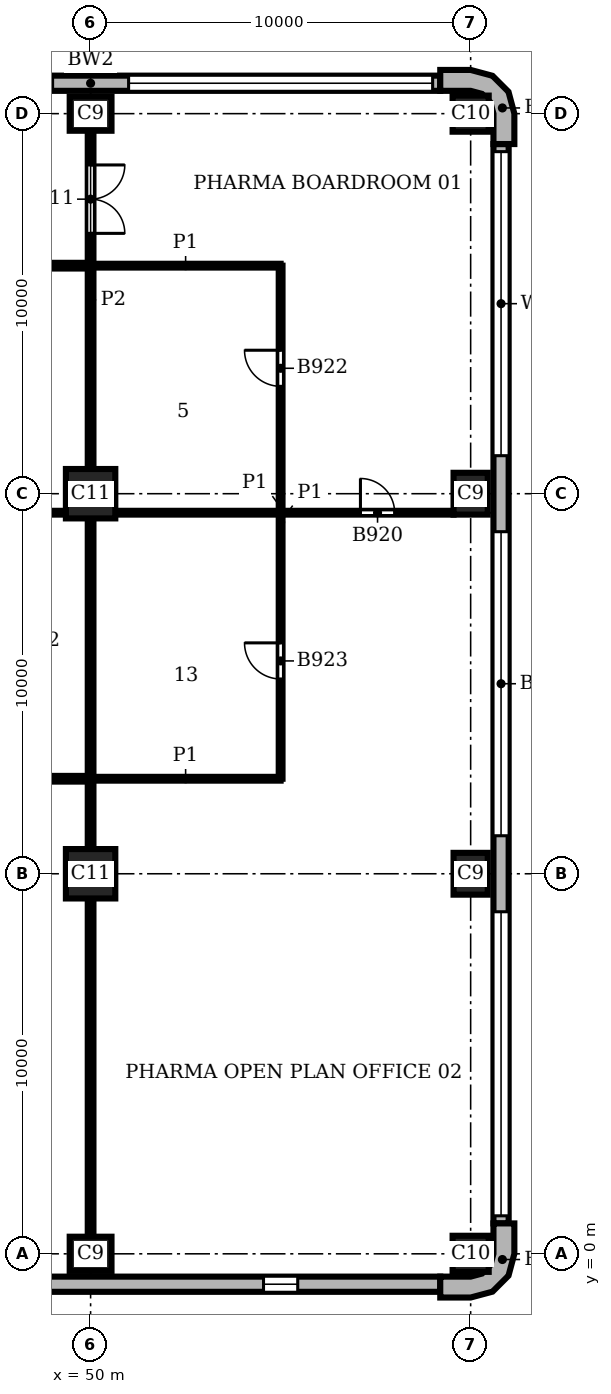
"""IFC4 building model, lengths in metres.
Left out: names, types, materials, properties, quantities, classifications, styles, units other than length and angle.
Written with IfcOpenShell. Run it as: python <this file> out.ifc"""

import sys

from ifc_helpers import new_model, si_unit, direction, frame, frame_2d, origin, origin_2d, place, context, subcontext, project, spatial, polyline, rectangle, outline, extrude, element, fill, save


model = new_model("IFC4")
c1 = context("Model", 3, precision=1e-05, world=origin(), true_north=direction((0.0, 1.0)))
c2 = subcontext(c1, "Body", "Model", "MODEL_VIEW")
j1 = project(units=[si_unit("LENGTHUNIT", "METRE"), si_unit("PLANEANGLEUNIT", "RADIAN")], contexts=[c1])
p1 = place(None, origin())
s1 = spatial("IfcSite", under=j1, at=p1, CompositionType="ELEMENT")
p2 = place(p1, origin())
s2 = spatial("IfcBuilding", under=s1, at=p2, CompositionType="ELEMENT")
p3 = place(p2, frame((0.0, 0.0, 233.1)))
s3 = spatial("IfcBuildingStorey", under=s2, at=p3, CompositionType="ELEMENT", Elevation=233.1)
p4 = place(p3, frame((50.0, 0.0, 0.0), z_axis=(0.0, 0.0, 1.0), x_axis=(1.0, 0.0, 0.0)))
e1 = element("IfcColumn", 1, at=p4, inside=s3, PredefinedType="COLUMN", context=c2, shape_type="SweptSolid", body=[
    extrude(rectangle(XDim=1.1, YDim=0.9, at=origin_2d()), origin(), (0.0, 0.0, 1.0), 3.9),
])
p5 = place(p3, frame((60.0, 0.0, 0.0), z_axis=(0.0, 0.0, 1.0), x_axis=(1.0, 0.0, 0.0)))
e2 = element("IfcColumn", 2, at=p5, inside=s3, PredefinedType="COLUMN", context=c2, shape_type="SweptSolid", body=[
    extrude(rectangle(XDim=0.95, YDim=0.95, at=origin_2d()), origin(), (0.0, 0.0, 1.0), 3.9),
])
for number, where, z_axis, x_axis in (
    (3, (60.0, 10.0, 0.0), (0.0, 0.0, 1.0), (0.0, 1.0, 0.0)),
    (4, (60.0, 20.0, 0.0), (0.0, 0.0, 1.0), (0.0, 1.0, 0.0)),
):
    element("IfcColumn", number, at=place(p3, frame(where, z_axis=z_axis, x_axis=x_axis)), inside=s3, PredefinedType="COLUMN", context=c2, shape_type="SweptSolid", body=[
        extrude(rectangle(XDim=1.1, YDim=0.9, at=origin_2d()), origin(), (0.0, 0.0, 1.0), 3.9),
    ])
p6 = place(p3, frame((60.0, 30.0, 0.0), z_axis=(0.0, 0.0, 1.0), x_axis=(1.0, 0.0, 0.0)))
e5 = element("IfcColumn", 5, at=p6, inside=s3, PredefinedType="COLUMN", context=c2, shape_type="SweptSolid", body=[
    extrude(rectangle(XDim=0.95, YDim=0.95, at=origin_2d()), origin(), (0.0, 0.0, 1.0), 3.9),
])
p7 = place(p3, frame((50.0, 30.0, 0.0), z_axis=(0.0, 0.0, 1.0), x_axis=(1.0, 0.0, 0.0)))
e6 = element("IfcColumn", 6, at=p7, inside=s3, PredefinedType="COLUMN", context=c2, shape_type="SweptSolid", body=[
    extrude(rectangle(XDim=1.1, YDim=0.9, at=origin_2d()), origin(), (0.0, 0.0, 1.0), 3.9),
])
for number, where, z_axis, x_axis in (
    (7, (50.0, 10.0, 0.0), (0.0, 0.0, 1.0), (1.0, 0.0, 0.0)),
    (8, (50.0, 20.0, 0.0), (0.0, 0.0, 1.0), (1.0, 0.0, 0.0)),
):
    element("IfcColumn", number, at=place(p3, frame(where, z_axis=z_axis, x_axis=x_axis)), inside=s3, PredefinedType="COLUMN", context=c2, shape_type="SweptSolid", body=[
        extrude(rectangle(XDim=1.3, YDim=1.3, at=origin_2d()), origin(), (0.0, 0.0, 1.0), 3.9),
    ])
p8 = place(p3, origin())
e9 = element("IfcWall", 9, at=p8, inside=s3, PredefinedType="SOLIDWALL", context=c2, shape_type="SweptSolid", body=[
    extrude(outline(polyline([(59.2, -1.0), (59.2, -1.15), (60.0, -1.15), (60.575, -0.996), (60.996, -0.575), (61.15, 0.0), (61.15, 0.8), (61.0, 0.8), (60.6, 0.8), (60.6, 0.0), (60.52, -0.3), (60.3, -0.52), (60.0, -0.6), (59.2, -0.6), (59.2, -1.0)])), origin(), (0.0, 0.0, 1.0), 3.9),
])
e10 = element("IfcWall", 10, at=p8, inside=s3, PredefinedType="SOLIDWALL", context=c2, shape_type="SweptSolid", body=[
    extrude(outline(polyline([(61.0, 29.2), (61.15, 29.2), (61.15, 30.0), (60.996, 30.575), (60.575, 30.996), (60.0, 31.15), (59.2, 31.15), (59.2, 31.0), (59.2, 30.6), (60.0, 30.6), (60.3, 30.52), (60.52, 30.3), (60.6, 30.0), (60.6, 29.2), (61.0, 29.2)])), origin(), (0.0, 0.0, 1.0), 3.9),
])
p9 = place(p3, frame((20.8, -0.8, 0.0), z_axis=(0.0, 0.0, 1.0), x_axis=(1.0, 0.0, 0.0)))
e11 = element("IfcWall", 11, at=p9, inside=s3, PredefinedType="SOLIDWALL", context=c2, shape_type="SweptSolid", body=[
    extrude(rectangle(XDim=38.4, YDim=0.4, at=frame_2d((19.2, 0.0))), origin(), (0.0, 0.0, 1.0), 3.9),
])
p10 = place(p9, frame((3.75, 0.0, 0.9)))
e12 = element("IfcOpeningElement", 12, at=p10, cuts=e11, PredefinedType="OPENING", context=c2, shape_type="SweptSolid", body=[
    extrude(rectangle(XDim=0.9, YDim=2.35, at=frame_2d((0.45, 1.175))), frame((0.0, 0.21, 0.0), z_axis=(0.0, -1.0, 0.0), x_axis=(1.0, 0.0, 0.0)), (0.0, 0.0, 1.0), 0.42),
])
p11 = place(p9, frame((13.75, 0.0, 0.9)))
e13 = element("IfcOpeningElement", 13, at=p11, cuts=e11, PredefinedType="OPENING", context=c2, shape_type="SweptSolid", body=[
    extrude(rectangle(XDim=0.9, YDim=2.35, at=frame_2d((0.45, 1.175))), frame((0.0, 0.21, 0.0), z_axis=(0.0, -1.0, 0.0), x_axis=(1.0, 0.0, 0.0)), (0.0, 0.0, 1.0), 0.42),
])
p12 = place(p9, frame((23.75, 0.0, 0.9)))
e14 = element("IfcOpeningElement", 14, at=p12, cuts=e11, PredefinedType="OPENING", context=c2, shape_type="SweptSolid", body=[
    extrude(rectangle(XDim=0.9, YDim=2.35, at=frame_2d((0.45, 1.175))), frame((0.0, 0.21, 0.0), z_axis=(0.0, -1.0, 0.0), x_axis=(1.0, 0.0, 0.0)), (0.0, 0.0, 1.0), 0.42),
])
p13 = place(p9, frame((33.75, 0.0, 0.9)))
e15 = element("IfcOpeningElement", 15, at=p13, cuts=e11, PredefinedType="OPENING", context=c2, shape_type="SweptSolid", body=[
    extrude(rectangle(XDim=0.9, YDim=2.35, at=frame_2d((0.45, 1.175))), frame((0.0, 0.21, 0.0), z_axis=(0.0, -1.0, 0.0), x_axis=(1.0, 0.0, 0.0)), (0.0, 0.0, 1.0), 0.42),
])
p14 = place(p3, frame((60.8, 0.8, 0.0), z_axis=(0.0, 0.0, 1.0), x_axis=(0.0, 1.0, 0.0)))
e16 = element("IfcWall", 16, at=p14, inside=s3, PredefinedType="SOLIDWALL", context=c2, shape_type="SweptSolid", body=[
    extrude(rectangle(XDim=28.4, YDim=0.4, at=frame_2d((14.2, 0.0))), origin(), (0.0, 0.0, 1.0), 3.9),
])
p15 = place(p14, frame((0.2, 0.0, 0.9)))
e17 = element("IfcOpeningElement", 17, at=p15, cuts=e16, PredefinedType="OPENING", context=c2, shape_type="SweptSolid", body=[
    extrude(rectangle(XDim=8.0, YDim=2.35, at=frame_2d((4.0, 1.175))), frame((0.0, 0.21, 0.0), z_axis=(0.0, -1.0, 0.0), x_axis=(1.0, 0.0, 0.0)), (0.0, 0.0, 1.0), 0.42),
])
p16 = place(p14, frame((10.2, 0.0, 0.9)))
e18 = element("IfcOpeningElement", 18, at=p16, cuts=e16, PredefinedType="OPENING", context=c2, shape_type="SweptSolid", body=[
    extrude(rectangle(XDim=8.0, YDim=2.35, at=frame_2d((4.0, 1.175))), frame((0.0, 0.21, 0.0), z_axis=(0.0, -1.0, 0.0), x_axis=(1.0, 0.0, 0.0)), (0.0, 0.0, 1.0), 0.42),
])
p17 = place(p14, frame((20.2, 0.0, 0.9)))
e19 = element("IfcOpeningElement", 19, at=p17, cuts=e16, PredefinedType="OPENING", context=c2, shape_type="SweptSolid", body=[
    extrude(rectangle(XDim=8.0, YDim=2.35, at=frame_2d((4.0, 1.175))), frame((0.0, 0.21, 0.0), z_axis=(0.0, -1.0, 0.0), x_axis=(1.0, 0.0, 0.0)), (0.0, 0.0, 1.0), 0.42),
])
p18 = place(p3, frame((59.2, 30.8, 0.0), z_axis=(0.0, 0.0, 1.0), x_axis=(-1.0, 0.0, 0.0)))
e20 = element("IfcWall", 20, at=p18, inside=s3, PredefinedType="SOLIDWALL", context=c2, shape_type="SweptSolid", body=[
    extrude(rectangle(XDim=18.4, YDim=0.4, at=frame_2d((9.2, 0.0))), origin(), (0.0, 0.0, 1.0), 3.9),
])
p19 = place(p18, frame((0.2, 0.0, 0.9)))
e21 = element("IfcOpeningElement", 21, at=p19, cuts=e20, PredefinedType="OPENING", context=c2, shape_type="SweptSolid", body=[
    extrude(rectangle(XDim=8.0, YDim=2.35, at=frame_2d((4.0, 1.175))), frame((0.0, 0.21, 0.0), z_axis=(0.0, -1.0, 0.0), x_axis=(1.0, 0.0, 0.0)), (0.0, 0.0, 1.0), 0.42),
])
p20 = place(p18, frame((10.2, 0.0, 0.9)))
e22 = element("IfcOpeningElement", 22, at=p20, cuts=e20, PredefinedType="OPENING", context=c2, shape_type="SweptSolid", body=[
    extrude(rectangle(XDim=8.0, YDim=2.35, at=frame_2d((4.0, 1.175))), frame((0.0, 0.21, 0.0), z_axis=(0.0, -1.0, 0.0), x_axis=(1.0, 0.0, 0.0)), (0.0, 0.0, 1.0), 0.42),
])
p21 = place(p3, frame((55.0, 12.5, 0.0), z_axis=(0.0, 0.0, 1.0), x_axis=(0.0, 1.0, 0.0)))
e23 = element("IfcWall", 23, at=p21, inside=s3, PredefinedType="PARTITIONING", context=c2, shape_type="SweptSolid", body=[
    extrude(rectangle(XDim=13.5, YDim=0.1, at=frame_2d((6.75, 0.0))), origin(), (0.0, 0.0, 1.0), 3.45),
])
p22 = place(p21, frame((10.325, 0.0, 0.0)))
e24 = element("IfcOpeningElement", 24, at=p22, cuts=e23, PredefinedType="OPENING", context=c2, shape_type="SweptSolid", body=[
    extrude(rectangle(XDim=0.95, YDim=2.1, at=frame_2d((0.475, 1.05))), frame((0.0, 0.06, 0.0), z_axis=(0.0, -1.0, 0.0), x_axis=(1.0, 0.0, 0.0)), (0.0, 0.0, 1.0), 0.12),
])
p23 = place(p21, frame((2.625, 0.0, 0.0)))
e25 = element("IfcOpeningElement", 25, at=p23, cuts=e23, PredefinedType="OPENING", context=c2, shape_type="SweptSolid", body=[
    extrude(rectangle(XDim=0.95, YDim=2.1, at=frame_2d((0.475, 1.05))), frame((0.0, 0.06, 0.0), z_axis=(0.0, -1.0, 0.0), x_axis=(1.0, 0.0, 0.0)), (0.0, 0.0, 1.0), 0.12),
])
p24 = place(p3, frame((50.0, 12.5, 0.0), z_axis=(0.0, 0.0, 1.0), x_axis=(1.0, 0.0, 0.0)))
e26 = element("IfcWall", 26, at=p24, inside=s3, PredefinedType="PARTITIONING", context=c2, shape_type="SweptSolid", body=[
    extrude(rectangle(XDim=5.0, YDim=0.1, at=frame_2d((2.5, 0.0))), origin(), (0.0, 0.0, 1.0), 3.45),
])
p25 = place(p3, frame((40.65, 19.5, 0.0), z_axis=(0.0, 0.0, 1.0), x_axis=(1.0, 0.0, 0.0)))
e27 = element("IfcWall", 27, at=p25, inside=s3, PredefinedType="PARTITIONING", context=c2, shape_type="SweptSolid", body=[
    extrude(rectangle(XDim=8.7, YDim=0.1, at=frame_2d((4.35, 0.0))), origin(), (0.0, 0.0, 1.0), 3.45),
])
p26 = place(p25, frame((4.675, 0.0, 0.0)))
e28 = element("IfcOpeningElement", 28, at=p26, cuts=e27, PredefinedType="OPENING", context=c2, shape_type="SweptSolid", body=[
    extrude(rectangle(XDim=0.95, YDim=2.1, at=frame_2d((0.475, 1.05))), frame((0.0, 0.06, 0.0), z_axis=(0.0, -1.0, 0.0), x_axis=(1.0, 0.0, 0.0)), (0.0, 0.0, 1.0), 0.12),
])
p27 = place(p3, frame((50.65, 19.5, 0.0), z_axis=(0.0, 0.0, 1.0), x_axis=(1.0, 0.0, 0.0)))
e29 = element("IfcWall", 29, at=p27, inside=s3, PredefinedType="PARTITIONING", context=c2, shape_type="SweptSolid", body=[
    extrude(rectangle(XDim=8.9, YDim=0.1, at=frame_2d((4.45, 0.0))), origin(), (0.0, 0.0, 1.0), 3.45),
])
p28 = place(p27, frame((6.45, 0.0, 0.0)))
e30 = element("IfcOpeningElement", 30, at=p28, cuts=e29, PredefinedType="OPENING", context=c2, shape_type="SweptSolid", body=[
    extrude(rectangle(XDim=0.9, YDim=2.1, at=frame_2d((0.45, 1.05))), frame((0.0, 0.06, 0.0), z_axis=(0.0, -1.0, 0.0), x_axis=(1.0, 0.0, 0.0)), (0.0, 0.0, 1.0), 0.12),
])
p29 = place(p3, frame((50.0, 26.0, 0.0), z_axis=(0.0, 0.0, 1.0), x_axis=(1.0, 0.0, 0.0)))
e31 = element("IfcWall", 31, at=p29, inside=s3, PredefinedType="PARTITIONING", context=c2, shape_type="SweptSolid", body=[
    extrude(rectangle(XDim=5.0, YDim=0.1, at=frame_2d((2.5, 0.0))), origin(), (0.0, 0.0, 1.0), 3.45),
])
p30 = place(p3, frame((50.0, 0.45, 0.0), z_axis=(0.0, 0.0, 1.0), x_axis=(0.0, 1.0, 0.0)))
e32 = element("IfcWall", 32, at=p30, inside=s3, PredefinedType="PARTITIONING", context=c2, shape_type="SweptSolid", body=[
    extrude(rectangle(XDim=8.9, YDim=0.15, at=frame_2d((4.45, 0.0))), origin(), (0.0, 0.0, 1.0), 3.45),
])
p31 = place(p3, frame((50.0, 10.65, 0.0), z_axis=(0.0, 0.0, 1.0), x_axis=(0.0, 1.0, 0.0)))
e33 = element("IfcWall", 33, at=p31, inside=s3, PredefinedType="PARTITIONING", context=c2, shape_type="SweptSolid", body=[
    extrude(rectangle(XDim=8.7, YDim=0.15, at=frame_2d((4.35, 0.0))), origin(), (0.0, 0.0, 1.0), 3.45),
])
p32 = place(p3, frame((50.0, 20.65, 0.0), z_axis=(0.0, 0.0, 1.0), x_axis=(0.0, 1.0, 0.0)))
e34 = element("IfcWall", 34, at=p32, inside=s3, PredefinedType="PARTITIONING", context=c2, shape_type="SweptSolid", body=[
    extrude(rectangle(XDim=8.9, YDim=0.15, at=frame_2d((4.45, 0.0))), origin(), (0.0, 0.0, 1.0), 3.45),
])
p33 = place(p32, frame((6.2, 0.0, 0.0)))
e35 = element("IfcOpeningElement", 35, at=p33, cuts=e34, PredefinedType="OPENING", context=c2, shape_type="SweptSolid", body=[
    extrude(rectangle(XDim=1.8, YDim=2.1, at=frame_2d((0.9, 1.05))), frame((0.0, 0.085, 0.0), z_axis=(0.0, -1.0, 0.0), x_axis=(1.0, 0.0, 0.0)), (0.0, 0.0, 1.0), 0.17),
])
p34 = place(p3, frame((33.2, 12.5, 0.0), z_axis=(0.0, 0.0, 1.0), x_axis=(1.0, 0.0, 0.0)))
e36 = element("IfcWall", 36, at=p34, inside=s3, PredefinedType="PARTITIONING", context=c2, shape_type="SweptSolid", body=[
    extrude(rectangle(XDim=16.8, YDim=0.15, at=frame_2d((8.4, 0.0))), origin(), (0.0, 0.0, 1.0), 3.45),
])
p35 = place(p3, frame((33.2, 26.0, 0.0), z_axis=(0.0, 0.0, 1.0), x_axis=(1.0, 0.0, 0.0)))
e37 = element("IfcWall", 37, at=p35, inside=s3, PredefinedType="PARTITIONING", context=c2, shape_type="SweptSolid", body=[
    extrude(rectangle(XDim=16.8, YDim=0.15, at=frame_2d((8.4, 0.0))), origin(), (0.0, 0.0, 1.0), 3.45),
])
p36 = place(p35, frame((9.4, 0.0, 0.0)))
e38 = element("IfcOpeningElement", 38, at=p36, cuts=e37, PredefinedType="OPENING", context=c2, shape_type="SweptSolid", body=[
    extrude(rectangle(XDim=1.0, YDim=2.1, at=frame_2d((0.5, 1.05))), frame((0.0, 0.085, 0.0), z_axis=(0.0, -1.0, 0.0), x_axis=(1.0, 0.0, 0.0)), (0.0, 0.0, 1.0), 0.17),
])
p37 = place(p13, origin())
e39 = element("IfcWindow", 39, at=p37, inside=s3, PartitioningType="SINGLE_PANEL", PredefinedType="WINDOW", context=c2, shape_type="SweptSolid", body=[
    extrude(rectangle(XDim=0.9, YDim=2.35, at=frame_2d((0.45, 1.175))), frame((0.0, 0.16, 0.0), z_axis=(0.0, -1.0, 0.0), x_axis=(1.0, 0.0, 0.0)), (0.0, 0.0, 1.0), 0.06),
])
fill(e15, e39)
p38 = place(p15, origin())
e40 = element("IfcWindow", 40, at=p38, inside=s3, PartitioningType="SINGLE_PANEL", PredefinedType="WINDOW", context=c2, shape_type="SweptSolid", body=[
    extrude(rectangle(XDim=8.0, YDim=2.35, at=frame_2d((4.0, 1.175))), frame((0.0, 0.16, 0.0), z_axis=(0.0, -1.0, 0.0), x_axis=(1.0, 0.0, 0.0)), (0.0, 0.0, 1.0), 0.06),
])
fill(e17, e40)
p39 = place(p16, origin())
e41 = element("IfcWindow", 41, at=p39, inside=s3, PartitioningType="SINGLE_PANEL", PredefinedType="WINDOW", context=c2, shape_type="SweptSolid", body=[
    extrude(rectangle(XDim=8.0, YDim=2.35, at=frame_2d((4.0, 1.175))), frame((0.0, 0.16, 0.0), z_axis=(0.0, -1.0, 0.0), x_axis=(1.0, 0.0, 0.0)), (0.0, 0.0, 1.0), 0.06),
])
fill(e18, e41)
p40 = place(p17, origin())
e42 = element("IfcWindow", 42, at=p40, inside=s3, PartitioningType="SINGLE_PANEL", PredefinedType="WINDOW", context=c2, shape_type="SweptSolid", body=[
    extrude(rectangle(XDim=8.0, YDim=2.35, at=frame_2d((4.0, 1.175))), frame((0.0, 0.16, 0.0), z_axis=(0.0, -1.0, 0.0), x_axis=(1.0, 0.0, 0.0)), (0.0, 0.0, 1.0), 0.06),
])
fill(e19, e42)
p41 = place(p19, origin())
e43 = element("IfcWindow", 43, at=p41, inside=s3, PartitioningType="SINGLE_PANEL", PredefinedType="WINDOW", context=c2, shape_type="SweptSolid", body=[
    extrude(rectangle(XDim=8.0, YDim=2.35, at=frame_2d((4.0, 1.175))), frame((0.0, 0.16, 0.0), z_axis=(0.0, -1.0, 0.0), x_axis=(1.0, 0.0, 0.0)), (0.0, 0.0, 1.0), 0.06),
])
fill(e21, e43)
p42 = place(p33, frame((1.8, 0.0, 0.0), z_axis=(0.0, 0.0, 1.0), x_axis=(-1.0, 0.0, 0.0)))
e44 = element("IfcDoor", 44, at=p42, inside=s3, OperationType="DOUBLE_DOOR_SINGLE_SWING", PredefinedType="DOOR", context=c2, shape_type="SweptSolid", body=[
    extrude(rectangle(XDim=1.8, YDim=2.1, at=frame_2d((0.9, 1.05))), frame((0.0, 0.025, 0.0), z_axis=(0.0, -1.0, 0.0), x_axis=(1.0, 0.0, 0.0)), (0.0, 0.0, 1.0), 0.05),
])
fill(e35, e44)
p43 = place(p28, origin())
e45 = element("IfcDoor", 45, at=p43, inside=s3, OperationType="SINGLE_SWING_LEFT", PredefinedType="DOOR", context=c2, shape_type="SweptSolid", body=[
    extrude(rectangle(XDim=0.9, YDim=2.1, at=frame_2d((0.45, 1.05))), frame((0.0, 0.025, 0.0), z_axis=(0.0, -1.0, 0.0), x_axis=(1.0, 0.0, 0.0)), (0.0, 0.0, 1.0), 0.05),
])
fill(e30, e45)
p44 = place(p22, origin())
e46 = element("IfcDoor", 46, at=p44, inside=s3, OperationType="SINGLE_SWING_RIGHT", PredefinedType="DOOR", context=c2, shape_type="SweptSolid", body=[
    extrude(rectangle(XDim=0.95, YDim=2.1, at=frame_2d((0.475, 1.05))), frame((0.0, 0.025, 0.0), z_axis=(0.0, -1.0, 0.0), x_axis=(1.0, 0.0, 0.0)), (0.0, 0.0, 1.0), 0.05),
])
fill(e24, e46)
p45 = place(p23, origin())
e47 = element("IfcDoor", 47, at=p45, inside=s3, OperationType="SINGLE_SWING_RIGHT", PredefinedType="DOOR", context=c2, shape_type="SweptSolid", body=[
    extrude(rectangle(XDim=0.95, YDim=2.1, at=frame_2d((0.475, 1.05))), frame((0.0, 0.025, 0.0), z_axis=(0.0, -1.0, 0.0), x_axis=(1.0, 0.0, 0.0)), (0.0, 0.0, 1.0), 0.05),
])
fill(e25, e47)
save(model, sys.argv[1])
